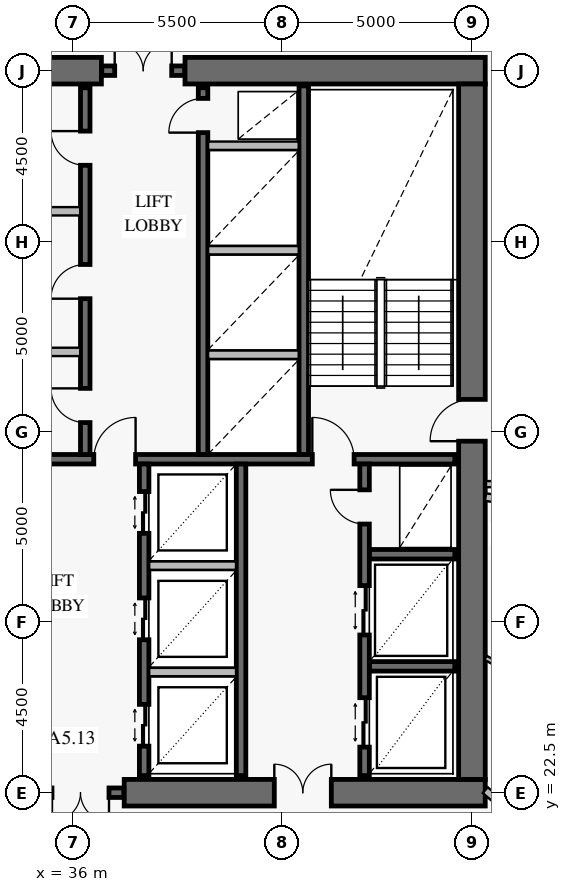
"""IFC4 building model, lengths in metres.
Left out: names, types, materials, properties, quantities, classifications, styles, units other than length and angle.
Written with IfcOpenShell. Run it as: python <this file> out.ifc"""

import sys

from ifc_helpers import new_model, si_unit, direction, frame, frame_2d, origin, place, context, subcontext, project, spatial, rectangle, extrude, element, fill, save


model = new_model("IFC4")
c1 = context("Model", 3, precision=1e-05, world=origin(), true_north=direction((0.0, 1.0)))
c2 = subcontext(c1, "Body", "Model", "MODEL_VIEW")
j1 = project(units=[si_unit("LENGTHUNIT", "METRE"), si_unit("PLANEANGLEUNIT", "RADIAN")], contexts=[c1])
p1 = place(None, origin())
s1 = spatial("IfcSite", under=j1, at=p1, CompositionType="ELEMENT")
p2 = place(p1, origin())
s2 = spatial("IfcBuilding", under=s1, at=p2, CompositionType="ELEMENT")
p3 = place(p2, frame((0.0, 0.0, 161.8)))
s3 = spatial("IfcBuildingStorey", under=s2, at=p3, CompositionType="ELEMENT", Elevation=161.8)
p4 = place(p3, frame((37.35, 22.5, 0.0), z_axis=(0.0, 0.0, 1.0), x_axis=(1.0, 0.0, 0.0)))
e1 = element("IfcWall", 1, at=p4, inside=s3, PredefinedType="SHEAR", context=c2, shape_type="SweptSolid", body=[
    extrude(rectangle(XDim=9.5, YDim=0.7, at=frame_2d((4.75, 0.0))), origin(), (0.0, 0.0, 1.0), 3.8),
])
p5 = place(p4, frame((3.95, 0.0, 0.0)))
e2 = element("IfcOpeningElement", 2, at=p5, cuts=e1, PredefinedType="OPENING", context=c2, shape_type="SweptSolid", body=[
    extrude(rectangle(XDim=1.5, YDim=2.15, at=frame_2d((0.75, 1.075))), frame((0.0, 0.362, 0.0), z_axis=(0.0, -1.0, 0.0), x_axis=(1.0, 0.0, 0.0)), (0.0, 0.0, 1.0), 0.724),
])
p6 = place(p3, frame((46.85, 41.5, 0.0), z_axis=(0.0, 0.0, 1.0), x_axis=(-1.0, 0.0, 0.0)))
e3 = element("IfcWall", 3, at=p6, inside=s3, PredefinedType="SHEAR", context=c2, shape_type="SweptSolid", body=[
    extrude(rectangle(XDim=7.9, YDim=0.7, at=frame_2d((3.95, 0.0))), origin(), (0.0, 0.0, 1.0), 3.8),
])
p7 = place(p3, frame((36.75, 41.5, 0.0), z_axis=(0.0, 0.0, 1.0), x_axis=(-1.0, 0.0, 0.0)))
e4 = element("IfcWall", 4, at=p7, inside=s3, PredefinedType="SHEAR", context=c2, shape_type="SweptSolid", body=[
    extrude(rectangle(XDim=11.6, YDim=0.7, at=frame_2d((5.8, 0.0))), origin(), (0.0, 0.0, 1.0), 3.8),
])
p8 = place(p7, frame((4.25, 0.0, 0.0)))
e5 = element("IfcOpeningElement", 5, at=p8, cuts=e4, PredefinedType="OPENING", context=c2, shape_type="SweptSolid", body=[
    extrude(rectangle(XDim=1.1, YDim=2.15, at=frame_2d((0.55, 1.075))), frame((0.0, 0.362, 0.0), z_axis=(0.0, -1.0, 0.0), x_axis=(1.0, 0.0, 0.0)), (0.0, 0.0, 1.0), 0.724),
])
p9 = place(p3, frame((46.5, 22.85, 0.0), z_axis=(0.0, 0.0, 1.0), x_axis=(0.0, 1.0, 0.0)))
e6 = element("IfcWall", 6, at=p9, inside=s3, PredefinedType="SHEAR", context=c2, shape_type="SweptSolid", body=[
    extrude(rectangle(XDim=18.3, YDim=0.7, at=frame_2d((9.15, 0.0))), origin(), (0.0, 0.0, 1.0), 3.8),
])
p10 = place(p9, frame((8.9, 0.0, 0.0)))
e7 = element("IfcOpeningElement", 7, at=p10, cuts=e6, PredefinedType="OPENING", context=c2, shape_type="SweptSolid", body=[
    extrude(rectangle(XDim=1.1, YDim=2.15, at=frame_2d((0.55, 1.075))), frame((0.0, 0.362, 0.0), z_axis=(0.0, -1.0, 0.0), x_axis=(1.0, 0.0, 0.0)), (0.0, 0.0, 1.0), 0.724),
])
p11 = place(p3, frame((35.06, 22.5, 0.0), z_axis=(0.0, 0.0, 1.0), x_axis=(1.0, 0.0, 0.0)))
e8 = element("IfcWall", 8, at=p11, inside=s3, PredefinedType="SOLIDWALL", context=c2, shape_type="SweptSolid", body=[
    extrude(rectangle(XDim=2.28, YDim=0.25, at=frame_2d((1.14, 0.0))), origin(), (0.0, 0.0, 1.0), 3.8),
])
p12 = place(p11, frame((0.39, 0.0, 0.0)))
e9 = element("IfcOpeningElement", 9, at=p12, cuts=e8, PredefinedType="OPENING", context=c2, shape_type="SweptSolid", body=[
    extrude(rectangle(XDim=1.5, YDim=2.15, at=frame_2d((0.75, 1.075))), frame((0.0, 0.137, 0.0), z_axis=(0.0, -1.0, 0.0), x_axis=(1.0, 0.0, 0.0)), (0.0, 0.0, 1.0), 0.274),
])
p13 = place(p3, frame((36.76, 41.5, 0.0), z_axis=(0.0, 0.0, 1.0), x_axis=(1.0, 0.0, 0.0)))
e10 = element("IfcWall", 10, at=p13, inside=s3, PredefinedType="SOLIDWALL", context=c2, shape_type="SweptSolid", body=[
    extrude(rectangle(XDim=2.18, YDim=0.25, at=frame_2d((1.09, 0.0))), origin(), (0.0, 0.0, 1.0), 3.8),
])
p14 = place(p13, frame((0.34, 0.0, 0.0)))
e11 = element("IfcOpeningElement", 11, at=p14, cuts=e10, PredefinedType="OPENING", context=c2, shape_type="SweptSolid", body=[
    extrude(rectangle(XDim=1.5, YDim=2.15, at=frame_2d((0.75, 1.075))), frame((0.0, 0.137, 0.0), z_axis=(0.0, -1.0, 0.0), x_axis=(1.0, 0.0, 0.0)), (0.0, 0.0, 1.0), 0.274),
])
p15 = place(p3, frame((25.95, 31.275, 0.0), z_axis=(0.0, 0.0, 1.0), x_axis=(1.0, 0.0, 0.0)))
e12 = element("IfcWall", 12, at=p15, inside=s3, PredefinedType="SOLIDWALL", context=c2, shape_type="SweptSolid", body=[
    extrude(rectangle(XDim=20.1, YDim=0.25, at=frame_2d((10.05, 0.0))), origin(), (0.0, 0.0, 1.0), 3.8),
])
p16 = place(p15, frame((2.6, 0.0, 0.0)))
e13 = element("IfcOpeningElement", 13, at=p16, cuts=e12, PredefinedType="OPENING", context=c2, shape_type="SweptSolid", body=[
    extrude(rectangle(XDim=1.1, YDim=2.15, at=frame_2d((0.55, 1.075))), frame((0.0, 0.137, 0.0), z_axis=(0.0, -1.0, 0.0), x_axis=(1.0, 0.0, 0.0)), (0.0, 0.0, 1.0), 0.274),
])
p17 = place(p15, frame((10.6, 0.0, 0.0)))
e14 = element("IfcOpeningElement", 14, at=p17, cuts=e12, PredefinedType="OPENING", context=c2, shape_type="SweptSolid", body=[
    extrude(rectangle(XDim=1.1, YDim=2.15, at=frame_2d((0.55, 1.075))), frame((0.0, 0.137, 0.0), z_axis=(0.0, -1.0, 0.0), x_axis=(1.0, 0.0, 0.0)), (0.0, 0.0, 1.0), 0.274),
])
p18 = place(p15, frame((16.35, 0.0, 0.0)))
e15 = element("IfcOpeningElement", 15, at=p18, cuts=e12, PredefinedType="OPENING", context=c2, shape_type="SweptSolid", body=[
    extrude(rectangle(XDim=1.1, YDim=2.15, at=frame_2d((0.55, 1.075))), frame((0.0, 0.137, 0.0), z_axis=(0.0, -1.0, 0.0), x_axis=(1.0, 0.0, 0.0)), (0.0, 0.0, 1.0), 0.274),
])
p19 = place(p3, frame((42.075, 31.4, 0.0), z_axis=(0.0, 0.0, 1.0), x_axis=(0.0, 1.0, 0.0)))
e16 = element("IfcWall", 16, at=p19, inside=s3, PredefinedType="SOLIDWALL", context=c2, shape_type="SweptSolid", body=[
    extrude(rectangle(XDim=9.7, YDim=0.25, at=frame_2d((4.85, 0.0))), origin(), (0.0, 0.0, 1.0), 3.8),
])
p20 = place(p3, frame((36.325, 31.4, 0.0), z_axis=(0.0, 0.0, 1.0), x_axis=(0.0, 1.0, 0.0)))
e17 = element("IfcWall", 17, at=p20, inside=s3, PredefinedType="SOLIDWALL", context=c2, shape_type="SweptSolid", body=[
    extrude(rectangle(XDim=9.65, YDim=0.25, at=frame_2d((4.825, 0.0))), origin(), (0.0, 0.0, 1.0), 3.8),
])
p21 = place(p20, frame((0.84, 0.0, 0.0)))
e18 = element("IfcOpeningElement", 18, at=p21, cuts=e17, PredefinedType="OPENING", context=c2, shape_type="SweptSolid", body=[
    extrude(rectangle(XDim=0.9, YDim=2.1, at=frame_2d((0.45, 1.05))), frame((0.0, 0.137, 0.0), z_axis=(0.0, -1.0, 0.0), x_axis=(1.0, 0.0, 0.0)), (0.0, 0.0, 1.0), 0.274),
])
p22 = place(p20, frame((4.1, 0.0, 0.0)))
e19 = element("IfcOpeningElement", 19, at=p22, cuts=e17, PredefinedType="OPENING", context=c2, shape_type="SweptSolid", body=[
    extrude(rectangle(XDim=0.9, YDim=2.1, at=frame_2d((0.45, 1.05))), frame((0.0, 0.137, 0.0), z_axis=(0.0, -1.0, 0.0), x_axis=(1.0, 0.0, 0.0)), (0.0, 0.0, 1.0), 0.274),
])
p23 = place(p20, frame((7.61, 0.0, 0.0)))
e20 = element("IfcOpeningElement", 20, at=p23, cuts=e17, PredefinedType="OPENING", context=c2, shape_type="SweptSolid", body=[
    extrude(rectangle(XDim=0.9, YDim=2.1, at=frame_2d((0.45, 1.05))), frame((0.0, 0.137, 0.0), z_axis=(0.0, -1.0, 0.0), x_axis=(1.0, 0.0, 0.0)), (0.0, 0.0, 1.0), 0.274),
])
p24 = place(p3, frame((39.425, 31.4, 0.0), z_axis=(0.0, 0.0, 1.0), x_axis=(0.0, 1.0, 0.0)))
e21 = element("IfcWall", 21, at=p24, inside=s3, PredefinedType="SOLIDWALL", context=c2, shape_type="SweptSolid", body=[
    extrude(rectangle(XDim=9.65, YDim=0.25, at=frame_2d((4.825, 0.0))), origin(), (0.0, 0.0, 1.0), 3.8),
])
p25 = place(p24, frame((8.47, 0.0, 0.0)))
e22 = element("IfcOpeningElement", 22, at=p25, cuts=e21, PredefinedType="OPENING", context=c2, shape_type="SweptSolid", body=[
    extrude(rectangle(XDim=0.9, YDim=2.1, at=frame_2d((0.45, 1.05))), frame((0.0, 0.137, 0.0), z_axis=(0.0, -1.0, 0.0), x_axis=(1.0, 0.0, 0.0)), (0.0, 0.0, 1.0), 0.274),
])
p26 = place(p3, frame((37.875, 22.95, 0.0), z_axis=(0.0, 0.0, 1.0), x_axis=(0.0, 1.0, 0.0)))
e23 = element("IfcWall", 23, at=p26, inside=s3, PredefinedType="SOLIDWALL", context=c2, shape_type="SweptSolid", body=[
    extrude(rectangle(XDim=8.2, YDim=0.25, at=frame_2d((4.1, 0.0))), origin(), (0.0, 0.0, 1.0), 3.8),
])
p27 = place(p26, frame((0.775, 0.0, 0.0)))
e24 = element("IfcOpeningElement", 24, at=p27, cuts=e23, PredefinedType="OPENING", context=c2, shape_type="SweptSolid", body=[
    extrude(rectangle(XDim=1.1, YDim=2.2, at=frame_2d((0.55, 1.1))), frame((0.0, 0.137, 0.0), z_axis=(0.0, -1.0, 0.0), x_axis=(1.0, 0.0, 0.0)), (0.0, 0.0, 1.0), 0.274),
])
p28 = place(p26, frame((3.575, 0.0, 0.0)))
e25 = element("IfcOpeningElement", 25, at=p28, cuts=e23, PredefinedType="OPENING", context=c2, shape_type="SweptSolid", body=[
    extrude(rectangle(XDim=1.1, YDim=2.2, at=frame_2d((0.55, 1.1))), frame((0.0, 0.137, 0.0), z_axis=(0.0, -1.0, 0.0), x_axis=(1.0, 0.0, 0.0)), (0.0, 0.0, 1.0), 0.274),
])
p29 = place(p26, frame((6.375, 0.0, 0.0)))
e26 = element("IfcOpeningElement", 26, at=p29, cuts=e23, PredefinedType="OPENING", context=c2, shape_type="SweptSolid", body=[
    extrude(rectangle(XDim=1.1, YDim=2.2, at=frame_2d((0.55, 1.1))), frame((0.0, 0.137, 0.0), z_axis=(0.0, -1.0, 0.0), x_axis=(1.0, 0.0, 0.0)), (0.0, 0.0, 1.0), 0.274),
])
p30 = place(p3, frame((40.425, 22.95, 0.0), z_axis=(0.0, 0.0, 1.0), x_axis=(0.0, 1.0, 0.0)))
e27 = element("IfcWall", 27, at=p30, inside=s3, PredefinedType="SOLIDWALL", context=c2, shape_type="SweptSolid", body=[
    extrude(rectangle(XDim=8.2, YDim=0.25, at=frame_2d((4.1, 0.0))), origin(), (0.0, 0.0, 1.0), 3.8),
])
for number, where, z_axis, x_axis in (
    (28, (43.8, 25.825, 0.0), (0.0, 0.0, 1.0), (1.0, 0.0, 0.0)),
    (29, (43.8, 28.775, 0.0), (0.0, 0.0, 1.0), (1.0, 0.0, 0.0)),
):
    element("IfcWall", number, at=place(p3, frame(where, z_axis=z_axis, x_axis=x_axis)), inside=s3, PredefinedType="SOLIDWALL", context=c2, shape_type="SweptSolid", body=[
        extrude(rectangle(XDim=2.25, YDim=0.25, at=frame_2d((1.125, 0.0))), origin(), (0.0, 0.0, 1.0), 3.8),
    ])
p31 = place(p3, frame((43.675, 22.95, 0.0), z_axis=(0.0, 0.0, 1.0), x_axis=(0.0, 1.0, 0.0)))
e30 = element("IfcWall", 30, at=p31, inside=s3, PredefinedType="SOLIDWALL", context=c2, shape_type="SweptSolid", body=[
    extrude(rectangle(XDim=8.2, YDim=0.25, at=frame_2d((4.1, 0.0))), origin(), (0.0, 0.0, 1.0), 3.8),
])
p32 = place(p31, frame((0.75, 0.0, 0.0)))
e31 = element("IfcOpeningElement", 31, at=p32, cuts=e30, PredefinedType="OPENING", context=c2, shape_type="SweptSolid", body=[
    extrude(rectangle(XDim=1.3, YDim=2.3, at=frame_2d((0.65, 1.15))), frame((0.0, 0.137, 0.0), z_axis=(0.0, -1.0, 0.0), x_axis=(1.0, 0.0, 0.0)), (0.0, 0.0, 1.0), 0.274),
])
p33 = place(p31, frame((3.7, 0.0, 0.0)))
e32 = element("IfcOpeningElement", 32, at=p33, cuts=e30, PredefinedType="OPENING", context=c2, shape_type="SweptSolid", body=[
    extrude(rectangle(XDim=1.3, YDim=2.3, at=frame_2d((0.65, 1.15))), frame((0.0, 0.137, 0.0), z_axis=(0.0, -1.0, 0.0), x_axis=(1.0, 0.0, 0.0)), (0.0, 0.0, 1.0), 0.274),
])
p34 = place(p31, frame((6.62, 0.0, 0.0)))
e33 = element("IfcOpeningElement", 33, at=p34, cuts=e30, PredefinedType="OPENING", context=c2, shape_type="SweptSolid", body=[
    extrude(rectangle(XDim=0.9, YDim=2.1, at=frame_2d((0.45, 1.05))), frame((0.0, 0.137, 0.0), z_axis=(0.0, -1.0, 0.0), x_axis=(1.0, 0.0, 0.0)), (0.0, 0.0, 1.0), 0.274),
])
p35 = place(p3, frame((46.858, 26.051, 0.0), z_axis=(0.0, 0.0, 1.0), x_axis=(0.876994813325, -0.480499841209, 0.0)))
e34 = element("IfcWall", 34, at=p35, inside=s3, PredefinedType="PARTITIONING", context=c2, shape_type="SweptSolid", body=[
    extrude(rectangle(XDim=2.438, YDim=0.12, at=frame_2d((1.219, 0.0))), origin(), (0.0, 0.0, 1.0), 3.55),
])
p36 = place(p35, frame((0.552, 0.0, 0.0)))
e35 = element("IfcOpeningElement", 35, at=p36, cuts=e34, PredefinedType="OPENING", context=c2, shape_type="SweptSolid", body=[
    extrude(rectangle(XDim=0.9, YDim=2.1, at=frame_2d((0.45, 1.05))), frame((0.0, 0.072, 0.0), z_axis=(0.0, -1.0, 0.0), x_axis=(1.0, 0.0, 0.0)), (0.0, 0.0, 1.0), 0.144),
])
p37 = place(p3, frame((46.87, 30.62, 0.0), z_axis=(0.0, 0.0, 1.0), x_axis=(1.0, 0.0, 0.0)))
e36 = element("IfcWall", 36, at=p37, inside=s3, PredefinedType="PARTITIONING", context=c2, shape_type="SweptSolid", body=[
    extrude(rectangle(XDim=2.03, YDim=0.16, at=frame_2d((1.015, 0.0))), origin(), (0.0, 0.0, 1.0), 3.55),
])
p38 = place(p37, frame((0.49, 0.0, 0.0)))
e37 = element("IfcOpeningElement", 37, at=p38, cuts=e36, PredefinedType="OPENING", context=c2, shape_type="SweptSolid", body=[
    extrude(rectangle(XDim=1.05, YDim=2.15, at=frame_2d((0.525, 1.075))), frame((0.0, 0.092, 0.0), z_axis=(0.0, -1.0, 0.0), x_axis=(1.0, 0.0, 0.0)), (0.0, 0.0, 1.0), 0.184),
])
for number, where, z_axis, x_axis in (
    (38, (34.108, 34.1, 0.0), (0.0, 0.0, 1.0), (1.0, 0.0, 0.0)),
    (39, (34.108, 37.8, 0.0), (0.0, 0.0, 1.0), (1.0, 0.0, 0.0)),
):
    element("IfcWall", number, at=place(p3, frame(where, z_axis=z_axis, x_axis=x_axis)), inside=s3, PredefinedType="PARTITIONING", context=c2, shape_type="SweptSolid", body=[
        extrude(rectangle(XDim=2.084, YDim=0.22, at=frame_2d((1.042, 0.0))), origin(), (0.0, 0.0, 1.0), 3.55),
    ])
for number, where, z_axis, x_axis in (
    (40, (39.558, 34.025, 0.0), (0.0, 0.0, 1.0), (1.0, 0.0, 0.0)),
    (41, (39.558, 36.775, 0.0), (0.0, 0.0, 1.0), (1.0, 0.0, 0.0)),
    (42, (39.558, 39.525, 0.0), (0.0, 0.0, 1.0), (1.0, 0.0, 0.0)),
):
    element("IfcWall", number, at=place(p3, frame(where, z_axis=z_axis, x_axis=x_axis)), inside=s3, PredefinedType="PARTITIONING", context=c2, shape_type="SweptSolid", body=[
        extrude(rectangle(XDim=2.384, YDim=0.22, at=frame_2d((1.192, 0.0))), origin(), (0.0, 0.0, 1.0), 3.55),
    ])
for number, where, z_axis, x_axis in (
    (43, (38.008, 25.675, 0.0), (0.0, 0.0, 1.0), (1.0, 0.0, 0.0)),
    (44, (38.008, 28.475, 0.0), (0.0, 0.0, 1.0), (1.0, 0.0, 0.0)),
):
    element("IfcWall", number, at=place(p3, frame(where, z_axis=z_axis, x_axis=x_axis)), inside=s3, PredefinedType="PARTITIONING", context=c2, shape_type="SweptSolid", body=[
        extrude(rectangle(XDim=2.284, YDim=0.22, at=frame_2d((1.142, 0.0))), origin(), (0.0, 0.0, 1.0), 3.55),
    ])
p39 = place(p3, frame((46.85, 22.568, 0.0), z_axis=(0.0, 0.0, 1.0), x_axis=(0.754890568134, -0.655850768196, 0.0)))
e45 = element("IfcWall", 45, at=p39, inside=s3, PredefinedType="PARTITIONING", context=c2, shape_type="SweptSolid", body=[
    extrude(rectangle(XDim=0.424, YDim=0.2, at=frame_2d((0.212, 0.0))), origin(), (0.0, 0.0, 1.0), 3.55),
])
p40 = place(p3, frame((46.858, 30.28, 0.0), z_axis=(0.0, 0.0, 1.0), x_axis=(0.987688144009, -0.156435706229, 0.0)))
e46 = element("IfcWall", 46, at=p40, inside=s3, PredefinedType="PARTITIONING", context=c2, shape_type="SweptSolid", body=[
    extrude(rectangle(XDim=18.124, YDim=0.2, at=frame_2d((9.062, 0.0))), origin(), (0.0, 0.0, 1.0), 2.87),
])
p41 = place(p10, origin())
e47 = element("IfcDoor", 47, at=p41, inside=s3, OperationType="SINGLE_SWING_LEFT", PredefinedType="USERDEFINED", context=c2, shape_type="SweptSolid", body=[
    extrude(rectangle(XDim=1.1, YDim=2.15, at=frame_2d((0.55, 1.075))), frame((0.0, 0.025, 0.0), z_axis=(0.0, -1.0, 0.0), x_axis=(1.0, 0.0, 0.0)), (0.0, 0.0, 1.0), 0.05),
])
fill(e7, e47)
p42 = place(p5, origin())
e48 = element("IfcDoor", 48, at=p42, inside=s3, OperationType="DOUBLE_DOOR_SINGLE_SWING", PredefinedType="DOOR", context=c2, shape_type="SweptSolid", body=[
    extrude(rectangle(XDim=1.5, YDim=2.15, at=frame_2d((0.75, 1.075))), frame((0.0, 0.025, 0.0), z_axis=(0.0, -1.0, 0.0), x_axis=(1.0, 0.0, 0.0)), (0.0, 0.0, 1.0), 0.05),
])
fill(e2, e48)
p43 = place(p12, frame((1.5, 0.0, 0.0), z_axis=(0.0, 0.0, 1.0), x_axis=(-1.0, 0.0, 0.0)))
e49 = element("IfcDoor", 49, at=p43, inside=s3, OperationType="DOUBLE_DOOR_SINGLE_SWING", PredefinedType="DOOR", context=c2, shape_type="SweptSolid", body=[
    extrude(rectangle(XDim=1.5, YDim=2.15, at=frame_2d((0.75, 1.075))), frame((0.0, 0.025, 0.0), z_axis=(0.0, -1.0, 0.0), x_axis=(1.0, 0.0, 0.0)), (0.0, 0.0, 1.0), 0.05),
])
fill(e9, e49)
p44 = place(p14, origin())
e50 = element("IfcDoor", 50, at=p44, inside=s3, OperationType="DOUBLE_DOOR_SINGLE_SWING", PredefinedType="DOOR", context=c2, shape_type="SweptSolid", body=[
    extrude(rectangle(XDim=1.5, YDim=2.15, at=frame_2d((0.75, 1.075))), frame((0.0, 0.025, 0.0), z_axis=(0.0, -1.0, 0.0), x_axis=(1.0, 0.0, 0.0)), (0.0, 0.0, 1.0), 0.05),
])
fill(e11, e50)
p45 = place(p17, origin())
e51 = element("IfcDoor", 51, at=p45, inside=s3, OperationType="SINGLE_SWING_RIGHT", PredefinedType="USERDEFINED", context=c2, shape_type="SweptSolid", body=[
    extrude(rectangle(XDim=1.1, YDim=2.15, at=frame_2d((0.55, 1.075))), frame((0.0, 0.025, 0.0), z_axis=(0.0, -1.0, 0.0), x_axis=(1.0, 0.0, 0.0)), (0.0, 0.0, 1.0), 0.05),
])
fill(e14, e51)
p46 = place(p18, origin())
e52 = element("IfcDoor", 52, at=p46, inside=s3, OperationType="SINGLE_SWING_LEFT", PredefinedType="USERDEFINED", context=c2, shape_type="SweptSolid", body=[
    extrude(rectangle(XDim=1.1, YDim=2.15, at=frame_2d((0.55, 1.075))), frame((0.0, 0.025, 0.0), z_axis=(0.0, -1.0, 0.0), x_axis=(1.0, 0.0, 0.0)), (0.0, 0.0, 1.0), 0.05),
])
fill(e15, e52)
p47 = place(p21, origin())
e53 = element("IfcDoor", 53, at=p47, inside=s3, OperationType="SINGLE_SWING_RIGHT", PredefinedType="DOOR", context=c2, shape_type="SweptSolid", body=[
    extrude(rectangle(XDim=0.9, YDim=2.1, at=frame_2d((0.45, 1.05))), frame((0.0, 0.025, 0.0), z_axis=(0.0, -1.0, 0.0), x_axis=(1.0, 0.0, 0.0)), (0.0, 0.0, 1.0), 0.05),
])
fill(e18, e53)
p48 = place(p22, origin())
e54 = element("IfcDoor", 54, at=p48, inside=s3, OperationType="SINGLE_SWING_LEFT", PredefinedType="DOOR", context=c2, shape_type="SweptSolid", body=[
    extrude(rectangle(XDim=0.9, YDim=2.1, at=frame_2d((0.45, 1.05))), frame((0.0, 0.025, 0.0), z_axis=(0.0, -1.0, 0.0), x_axis=(1.0, 0.0, 0.0)), (0.0, 0.0, 1.0), 0.05),
])
fill(e19, e54)
p49 = place(p23, origin())
e55 = element("IfcDoor", 55, at=p49, inside=s3, OperationType="SINGLE_SWING_RIGHT", PredefinedType="DOOR", context=c2, shape_type="SweptSolid", body=[
    extrude(rectangle(XDim=0.9, YDim=2.1, at=frame_2d((0.45, 1.05))), frame((0.0, 0.025, 0.0), z_axis=(0.0, -1.0, 0.0), x_axis=(1.0, 0.0, 0.0)), (0.0, 0.0, 1.0), 0.05),
])
fill(e20, e55)
p50 = place(p25, origin())
e56 = element("IfcDoor", 56, at=p50, inside=s3, OperationType="SINGLE_SWING_LEFT", PredefinedType="DOOR", context=c2, shape_type="SweptSolid", body=[
    extrude(rectangle(XDim=0.9, YDim=2.1, at=frame_2d((0.45, 1.05))), frame((0.0, 0.025, 0.0), z_axis=(0.0, -1.0, 0.0), x_axis=(1.0, 0.0, 0.0)), (0.0, 0.0, 1.0), 0.05),
])
fill(e22, e56)
p51 = place(p27, origin())
e57 = element("IfcDoor", 57, at=p51, inside=s3, OperationType="DOUBLE_DOOR_SLIDING", PredefinedType="DOOR", context=c2, shape_type="SweptSolid", body=[
    extrude(rectangle(XDim=1.1, YDim=2.2, at=frame_2d((0.55, 1.1))), frame((0.0, 0.025, 0.0), z_axis=(0.0, -1.0, 0.0), x_axis=(1.0, 0.0, 0.0)), (0.0, 0.0, 1.0), 0.05),
])
fill(e24, e57)
p52 = place(p28, origin())
e58 = element("IfcDoor", 58, at=p52, inside=s3, OperationType="DOUBLE_DOOR_SLIDING", PredefinedType="DOOR", context=c2, shape_type="SweptSolid", body=[
    extrude(rectangle(XDim=1.1, YDim=2.2, at=frame_2d((0.55, 1.1))), frame((0.0, 0.025, 0.0), z_axis=(0.0, -1.0, 0.0), x_axis=(1.0, 0.0, 0.0)), (0.0, 0.0, 1.0), 0.05),
])
fill(e25, e58)
p53 = place(p29, origin())
e59 = element("IfcDoor", 59, at=p53, inside=s3, OperationType="DOUBLE_DOOR_SLIDING", PredefinedType="DOOR", context=c2, shape_type="SweptSolid", body=[
    extrude(rectangle(XDim=1.1, YDim=2.2, at=frame_2d((0.55, 1.1))), frame((0.0, 0.025, 0.0), z_axis=(0.0, -1.0, 0.0), x_axis=(1.0, 0.0, 0.0)), (0.0, 0.0, 1.0), 0.05),
])
fill(e26, e59)
p54 = place(p32, origin())
e60 = element("IfcDoor", 60, at=p54, inside=s3, OperationType="DOUBLE_DOOR_SLIDING", PredefinedType="DOOR", context=c2, shape_type="SweptSolid", body=[
    extrude(rectangle(XDim=1.3, YDim=2.3, at=frame_2d((0.65, 1.15))), frame((0.0, 0.025, 0.0), z_axis=(0.0, -1.0, 0.0), x_axis=(1.0, 0.0, 0.0)), (0.0, 0.0, 1.0), 0.05),
])
fill(e31, e60)
p55 = place(p33, origin())
e61 = element("IfcDoor", 61, at=p55, inside=s3, OperationType="DOUBLE_DOOR_SLIDING", PredefinedType="DOOR", context=c2, shape_type="SweptSolid", body=[
    extrude(rectangle(XDim=1.3, YDim=2.3, at=frame_2d((0.65, 1.15))), frame((0.0, 0.025, 0.0), z_axis=(0.0, -1.0, 0.0), x_axis=(1.0, 0.0, 0.0)), (0.0, 0.0, 1.0), 0.05),
])
fill(e32, e61)
p56 = place(p34, origin())
e62 = element("IfcDoor", 62, at=p56, inside=s3, OperationType="SINGLE_SWING_RIGHT", PredefinedType="DOOR", context=c2, shape_type="SweptSolid", body=[
    extrude(rectangle(XDim=0.9, YDim=2.1, at=frame_2d((0.45, 1.05))), frame((0.0, 0.025, 0.0), z_axis=(0.0, -1.0, 0.0), x_axis=(1.0, 0.0, 0.0)), (0.0, 0.0, 1.0), 0.05),
])
fill(e33, e62)
save(model, sys.argv[1])
